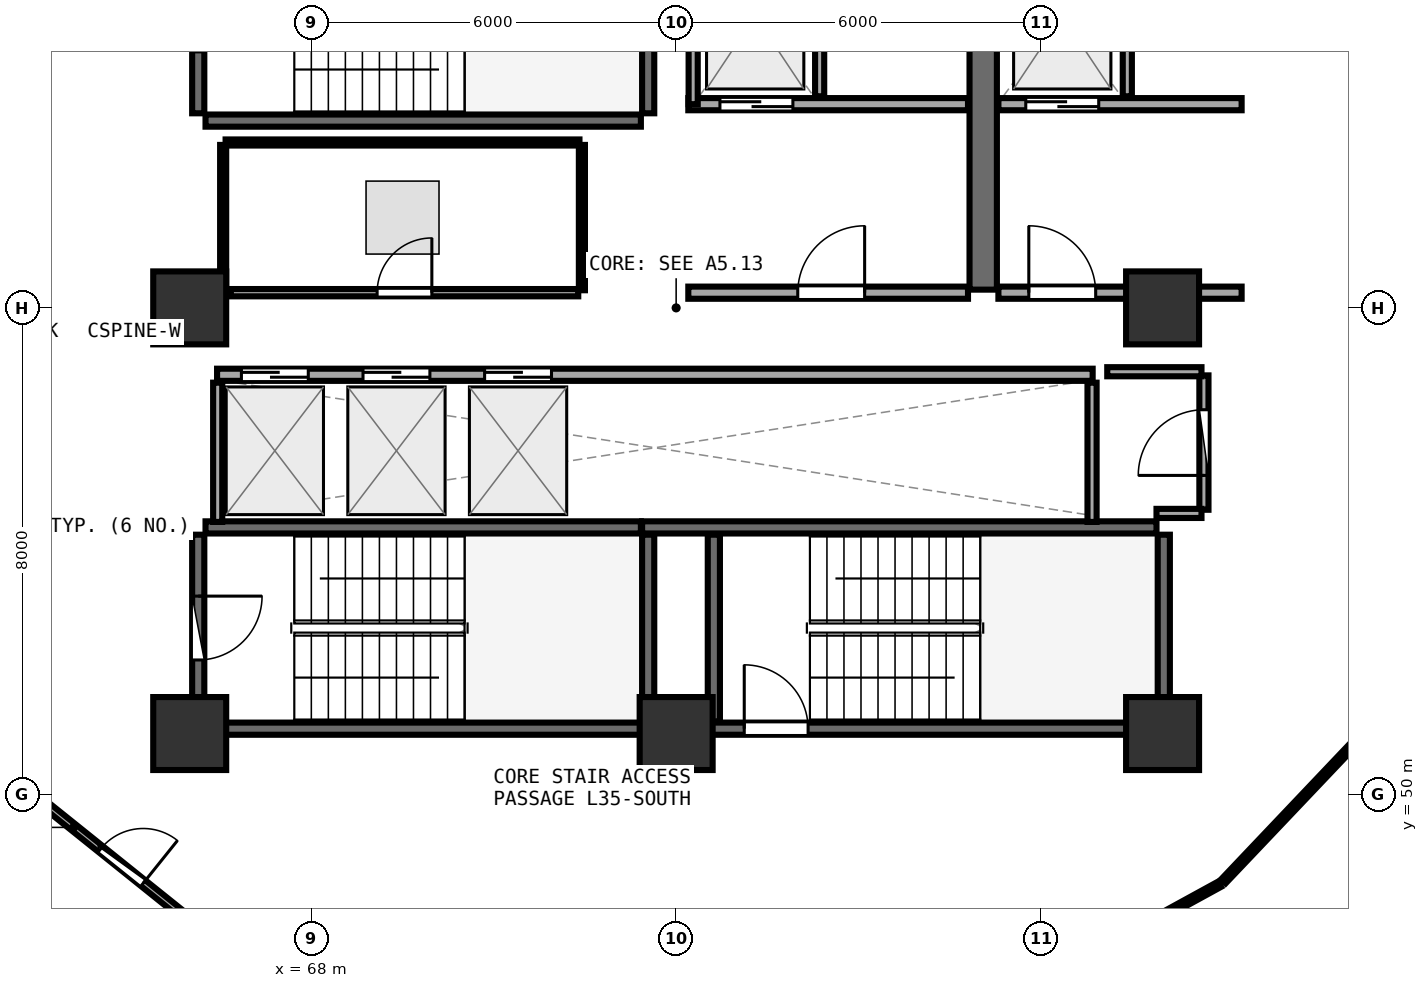
"""IFC4 building model, lengths in metres.
Left out: names, types, materials, properties, quantities, classifications, styles, units other than length and angle.
Written with IfcOpenShell. Run it as: python <this file> out.ifc"""

import sys

from ifc_helpers import new_model, si_unit, direction, frame, frame_2d, origin, origin_2d, place, context, subcontext, project, spatial, rectangle, extrude, element, fill, save


model = new_model("IFC4")
c1 = context("Model", 3, precision=1e-05, world=origin(), true_north=direction((0.0, 1.0)))
c2 = subcontext(c1, "Body", "Model", "MODEL_VIEW")
j1 = project(units=[si_unit("LENGTHUNIT", "METRE"), si_unit("PLANEANGLEUNIT", "RADIAN")], contexts=[c1])
p1 = place(None, origin())
s1 = spatial("IfcSite", under=j1, at=p1, CompositionType="ELEMENT")
p2 = place(p1, origin())
s2 = spatial("IfcBuilding", under=s1, at=p2, CompositionType="ELEMENT")
p3 = place(p2, frame((0.0, 0.0, 139.35)))
s3 = spatial("IfcBuildingStorey", under=s2, at=p3, CompositionType="ELEMENT", Elevation=139.35)
for number, where, z_axis, x_axis in (
    (1, (66.0, 51.0, 0.0), (0.0, 0.0, 1.0), (1.0, 0.0, 0.0)),
    (2, (74.0, 51.0, 0.0), (0.0, 0.0, 1.0), (1.0, 0.0, 0.0)),
    (3, (82.0, 51.0, 0.0), (0.0, 0.0, 1.0), (1.0, 0.0, 0.0)),
    (4, (82.0, 58.0, 0.0), (0.0, 0.0, 1.0), (1.0, 0.0, 0.0)),
    (5, (66.0, 58.0, 0.0), (0.0, 0.0, 1.0), (1.0, 0.0, 0.0)),
):
    element("IfcColumn", number, at=place(p3, frame(where, z_axis=z_axis, x_axis=x_axis)), inside=s3, PredefinedType="PILASTER", context=c2, shape_type="SweptSolid", body=[
        extrude(rectangle(XDim=1.2, YDim=1.2, at=origin_2d()), origin(), (0.0, 0.0, 1.0), 3.75),
    ])
p4 = place(p3, frame((66.26, 61.08, 0.0), z_axis=(0.0, 0.0, 1.0), x_axis=(1.0, 0.0, 0.0)))
e6 = element("IfcWall", 6, at=p4, inside=s3, PredefinedType="SHEAR", context=c2, shape_type="SweptSolid", body=[
    extrude(rectangle(XDim=7.16, YDim=0.2, at=frame_2d((3.58, 0.0))), origin(), (0.0, 0.0, 1.0), 3.49),
])
p5 = place(p3, frame((73.54, 61.2, 0.0), z_axis=(0.0, 0.0, 1.0), x_axis=(0.0, 1.0, 0.0)))
e7 = element("IfcWall", 7, at=p5, inside=s3, PredefinedType="SHEAR", context=c2, shape_type="SweptSolid", body=[
    extrude(rectangle(XDim=3.07, YDim=0.2, at=frame_2d((1.535, 0.0))), origin(), (0.0, 0.0, 1.0), 3.49),
])
p6 = place(p3, frame((66.14, 64.27, 0.0), z_axis=(0.0, 0.0, 1.0), x_axis=(0.0, -1.0, 0.0)))
e8 = element("IfcWall", 8, at=p6, inside=s3, PredefinedType="SHEAR", context=c2, shape_type="SweptSolid", body=[
    extrude(rectangle(XDim=3.07, YDim=0.2, at=frame_2d((1.535, 0.0))), origin(), (0.0, 0.0, 1.0), 3.49),
])
p7 = place(p6, frame((1.01, 0.0, 0.0)))
e9 = element("IfcOpeningElement", 9, at=p7, cuts=e8, PredefinedType="OPENING", context=c2, shape_type="SweptSolid", body=[
    extrude(rectangle(XDim=1.05, YDim=2.1, at=frame_2d((0.525, 1.05))), frame((0.0, 0.11, 0.0), z_axis=(0.0, -1.0, 0.0), x_axis=(1.0, 0.0, 0.0)), (0.0, 0.0, 1.0), 0.22),
])
p8 = place(p3, frame((74.0, 51.08, 0.0), z_axis=(0.0, 0.0, 1.0), x_axis=(1.0, 0.0, 0.0)))
e10 = element("IfcWall", 10, at=p8, inside=s3, PredefinedType="SHEAR", context=c2, shape_type="SweptSolid", body=[
    extrude(rectangle(XDim=7.9, YDim=0.2, at=frame_2d((3.95, 0.0))), origin(), (0.0, 0.0, 1.0), 3.49),
])
p9 = place(p8, frame((1.12, 0.0, 0.0)))
e11 = element("IfcOpeningElement", 11, at=p9, cuts=e10, PredefinedType="OPENING", context=c2, shape_type="SweptSolid", body=[
    extrude(rectangle(XDim=1.05, YDim=2.1, at=frame_2d((0.525, 1.05))), frame((0.0, 0.11, 0.0), z_axis=(0.0, -1.0, 0.0), x_axis=(1.0, 0.0, 0.0)), (0.0, 0.0, 1.0), 0.22),
])
p10 = place(p3, frame((82.02, 51.2, 0.0), z_axis=(0.0, 0.0, 1.0), x_axis=(0.0, 1.0, 0.0)))
e12 = element("IfcWall", 12, at=p10, inside=s3, PredefinedType="SHEAR", context=c2, shape_type="SweptSolid", body=[
    extrude(rectangle(XDim=3.07, YDim=0.2, at=frame_2d((1.535, 0.0))), origin(), (0.0, 0.0, 1.0), 3.49),
])
p11 = place(p3, frame((81.9, 54.39, 0.0), z_axis=(0.0, 0.0, 1.0), x_axis=(-1.0, 0.0, 0.0)))
e13 = element("IfcWall", 13, at=p11, inside=s3, PredefinedType="SHEAR", context=c2, shape_type="SweptSolid", body=[
    extrude(rectangle(XDim=8.46, YDim=0.2, at=frame_2d((4.23, 0.0))), origin(), (0.0, 0.0, 1.0), 3.49),
])
p12 = place(p3, frame((74.62, 54.27, 0.0), z_axis=(0.0, 0.0, 1.0), x_axis=(0.0, -1.0, 0.0)))
e14 = element("IfcWall", 14, at=p12, inside=s3, PredefinedType="SHEAR", context=c2, shape_type="SweptSolid", body=[
    extrude(rectangle(XDim=3.07, YDim=0.2, at=frame_2d((1.535, 0.0))), origin(), (0.0, 0.0, 1.0), 3.49),
])
p13 = place(p3, frame((66.26, 51.08, 0.0), z_axis=(0.0, 0.0, 1.0), x_axis=(1.0, 0.0, 0.0)))
e15 = element("IfcWall", 15, at=p13, inside=s3, PredefinedType="SHEAR", context=c2, shape_type="SweptSolid", body=[
    extrude(rectangle(XDim=7.16, YDim=0.2, at=frame_2d((3.58, 0.0))), origin(), (0.0, 0.0, 1.0), 3.49),
])
p14 = place(p3, frame((73.54, 51.2, 0.0), z_axis=(0.0, 0.0, 1.0), x_axis=(0.0, 1.0, 0.0)))
e16 = element("IfcWall", 16, at=p14, inside=s3, PredefinedType="SHEAR", context=c2, shape_type="SweptSolid", body=[
    extrude(rectangle(XDim=3.07, YDim=0.2, at=frame_2d((1.535, 0.0))), origin(), (0.0, 0.0, 1.0), 3.49),
])
p15 = place(p3, frame((73.42, 54.39, 0.0), z_axis=(0.0, 0.0, 1.0), x_axis=(-1.0, 0.0, 0.0)))
e17 = element("IfcWall", 17, at=p15, inside=s3, PredefinedType="SHEAR", context=c2, shape_type="SweptSolid", body=[
    extrude(rectangle(XDim=7.16, YDim=0.2, at=frame_2d((3.58, 0.0))), origin(), (0.0, 0.0, 1.0), 3.49),
])
p16 = place(p3, frame((66.14, 54.27, 0.0), z_axis=(0.0, 0.0, 1.0), x_axis=(0.0, -1.0, 0.0)))
e18 = element("IfcWall", 18, at=p16, inside=s3, PredefinedType="SHEAR", context=c2, shape_type="SweptSolid", body=[
    extrude(rectangle(XDim=3.07, YDim=0.2, at=frame_2d((1.535, 0.0))), origin(), (0.0, 0.0, 1.0), 3.49),
])
p17 = place(p16, frame((1.01, 0.0, 0.0)))
e19 = element("IfcOpeningElement", 19, at=p17, cuts=e18, PredefinedType="OPENING", context=c2, shape_type="SweptSolid", body=[
    extrude(rectangle(XDim=1.05, YDim=2.1, at=frame_2d((0.525, 1.05))), frame((0.0, 0.11, 0.0), z_axis=(0.0, -1.0, 0.0), x_axis=(1.0, 0.0, 0.0)), (0.0, 0.0, 1.0), 0.22),
])
p18 = place(p3, frame((79.05, 58.3, 0.0), z_axis=(0.0, 0.0, 1.0), x_axis=(0.0, 1.0, 0.0)))
e20 = element("IfcWall", 20, at=p18, inside=s3, PredefinedType="SHEAR", context=c2, shape_type="SweptSolid", body=[
    extrude(rectangle(XDim=6.3, YDim=0.45, at=frame_2d((3.15, 0.0))), origin(), (0.0, 0.0, 1.0), 3.49),
])
p19 = place(p3, frame((74.2, 61.35, 0.0), z_axis=(0.0, 0.0, 1.0), x_axis=(1.0, 0.0, 0.0)))
e21 = element("IfcWall", 21, at=p19, inside=s3, PredefinedType="SOLIDWALL", context=c2, shape_type="SweptSolid", body=[
    extrude(rectangle(XDim=4.6, YDim=0.2, at=frame_2d((2.3, 0.0))), origin(), (0.0, 0.0, 1.0), 3.48),
])
p20 = place(p19, frame((0.52, 0.0, 0.0)))
e22 = element("IfcOpeningElement", 22, at=p20, cuts=e21, PredefinedType="OPENING", context=c2, shape_type="SweptSolid", body=[
    extrude(rectangle(XDim=1.2, YDim=2.15, at=frame_2d((0.6, 1.075))), frame((0.0, 0.11, 0.0), z_axis=(0.0, -1.0, 0.0), x_axis=(1.0, 0.0, 0.0)), (0.0, 0.0, 1.0), 0.22),
])
p21 = place(p3, frame((74.28, 61.35, 0.0), z_axis=(0.0, 0.0, 1.0), x_axis=(0.0, 1.0, 0.0)))
e23 = element("IfcWall", 23, at=p21, inside=s3, PredefinedType="PARTITIONING", context=c2, shape_type="SweptSolid", body=[
    extrude(rectangle(XDim=2.97, YDim=0.15, at=frame_2d((1.485, 0.0))), origin(), (0.0, 0.0, 1.0), 3.48),
])
p22 = place(p3, frame((76.36, 61.48, 0.0), z_axis=(0.0, 0.0, 1.0), x_axis=(0.0, 1.0, 0.0)))
e24 = element("IfcWall", 24, at=p22, inside=s3, PredefinedType="PARTITIONING", context=c2, shape_type="SweptSolid", body=[
    extrude(rectangle(XDim=2.84, YDim=0.15, at=frame_2d((1.42, 0.0))), origin(), (0.0, 0.0, 1.0), 3.48),
])
p23 = place(p3, frame((79.3, 61.35, 0.0), z_axis=(0.0, 0.0, 1.0), x_axis=(1.0, 0.0, 0.0)))
e25 = element("IfcWall", 25, at=p23, inside=s3, PredefinedType="SOLIDWALL", context=c2, shape_type="SweptSolid", body=[
    extrude(rectangle(XDim=4.0, YDim=0.2, at=frame_2d((2.0, 0.0))), origin(), (0.0, 0.0, 1.0), 2.775),
])
p24 = place(p23, frame((0.45, 0.0, 0.0)))
e26 = element("IfcOpeningElement", 26, at=p24, cuts=e25, PredefinedType="OPENING", context=c2, shape_type="SweptSolid", body=[
    extrude(rectangle(XDim=1.2, YDim=2.15, at=frame_2d((0.6, 1.075))), frame((0.0, 0.11, 0.0), z_axis=(0.0, -1.0, 0.0), x_axis=(1.0, 0.0, 0.0)), (0.0, 0.0, 1.0), 0.22),
])
p25 = place(p3, frame((81.42, 61.48, 0.0), z_axis=(0.0, 0.0, 1.0), x_axis=(0.0, 1.0, 0.0)))
e27 = element("IfcWall", 27, at=p25, inside=s3, PredefinedType="PARTITIONING", context=c2, shape_type="SweptSolid", body=[
    extrude(rectangle(XDim=2.84, YDim=0.15, at=frame_2d((1.42, 0.0))), origin(), (0.0, 0.0, 1.0), 3.48),
])
p26 = place(p3, frame((74.2, 58.25, 0.0), z_axis=(0.0, 0.0, 1.0), x_axis=(1.0, 0.0, 0.0)))
e28 = element("IfcWall", 28, at=p26, inside=s3, PredefinedType="SOLIDWALL", context=c2, shape_type="SweptSolid", body=[
    extrude(rectangle(XDim=4.6, YDim=0.2, at=frame_2d((2.3, 0.0))), origin(), (0.0, 0.0, 1.0), 3.48),
])
p27 = place(p26, frame((1.8, 0.0, 0.0)))
e29 = element("IfcOpeningElement", 29, at=p27, cuts=e28, PredefinedType="OPENING", context=c2, shape_type="SweptSolid", body=[
    extrude(rectangle(XDim=1.1, YDim=2.1, at=frame_2d((0.55, 1.05))), frame((0.0, 0.11, 0.0), z_axis=(0.0, -1.0, 0.0), x_axis=(1.0, 0.0, 0.0)), (0.0, 0.0, 1.0), 0.22),
])
p28 = place(p3, frame((79.3, 58.25, 0.0), z_axis=(0.0, 0.0, 1.0), x_axis=(1.0, 0.0, 0.0)))
e30 = element("IfcWall", 30, at=p28, inside=s3, PredefinedType="SOLIDWALL", context=c2, shape_type="SweptSolid", body=[
    extrude(rectangle(XDim=4.0, YDim=0.2, at=frame_2d((2.0, 0.0))), origin(), (0.0, 0.0, 1.0), 2.775),
])
p29 = place(p28, frame((0.5, 0.0, 0.0)))
e31 = element("IfcOpeningElement", 31, at=p29, cuts=e30, PredefinedType="OPENING", context=c2, shape_type="SweptSolid", body=[
    extrude(rectangle(XDim=1.1, YDim=2.1, at=frame_2d((0.55, 1.05))), frame((0.0, 0.11, 0.0), z_axis=(0.0, -1.0, 0.0), x_axis=(1.0, 0.0, 0.0)), (0.0, 0.0, 1.0), 0.22),
])
p30 = place(p3, frame((66.45, 56.9, 0.0), z_axis=(0.0, 0.0, 1.0), x_axis=(1.0, 0.0, 0.0)))
e32 = element("IfcWall", 32, at=p30, inside=s3, PredefinedType="SOLIDWALL", context=c2, shape_type="SweptSolid", body=[
    extrude(rectangle(XDim=14.4, YDim=0.2, at=frame_2d((7.2, 0.0))), origin(), (0.0, 0.0, 1.0), 3.48),
])
p31 = place(p30, frame((0.4, 0.0, 0.0)))
e33 = element("IfcOpeningElement", 33, at=p31, cuts=e32, PredefinedType="OPENING", context=c2, shape_type="SweptSolid", body=[
    extrude(rectangle(XDim=1.1, YDim=2.1, at=frame_2d((0.55, 1.05))), frame((0.0, 0.11, 0.0), z_axis=(0.0, -1.0, 0.0), x_axis=(1.0, 0.0, 0.0)), (0.0, 0.0, 1.0), 0.22),
])
p32 = place(p30, frame((2.4, 0.0, 0.0)))
e34 = element("IfcOpeningElement", 34, at=p32, cuts=e32, PredefinedType="OPENING", context=c2, shape_type="SweptSolid", body=[
    extrude(rectangle(XDim=1.1, YDim=2.1, at=frame_2d((0.55, 1.05))), frame((0.0, 0.11, 0.0), z_axis=(0.0, -1.0, 0.0), x_axis=(1.0, 0.0, 0.0)), (0.0, 0.0, 1.0), 0.22),
])
p33 = place(p30, frame((4.4, 0.0, 0.0)))
e35 = element("IfcOpeningElement", 35, at=p33, cuts=e32, PredefinedType="OPENING", context=c2, shape_type="SweptSolid", body=[
    extrude(rectangle(XDim=1.1, YDim=2.1, at=frame_2d((0.55, 1.05))), frame((0.0, 0.11, 0.0), z_axis=(0.0, -1.0, 0.0), x_axis=(1.0, 0.0, 0.0)), (0.0, 0.0, 1.0), 0.22),
])
for number, where, z_axis, x_axis in (
    (36, (66.46, 54.48, 0.0), (0.0, 0.0, 1.0), (0.0, 1.0, 0.0)),
    (37, (80.84, 54.48, 0.0), (0.0, 0.0, 1.0), (0.0, 1.0, 0.0)),
):
    element("IfcWall", number, at=place(p3, frame(where, z_axis=z_axis, x_axis=x_axis)), inside=s3, PredefinedType="PARTITIONING", context=c2, shape_type="SweptSolid", body=[
        extrude(rectangle(XDim=2.29, YDim=0.15, at=frame_2d((1.145, 0.0))), origin(), (0.0, 0.0, 1.0), 3.48),
    ])
p34 = place(p3, frame((82.68, 54.68, 0.0), z_axis=(0.0, 0.0, 1.0), x_axis=(0.0, 1.0, 0.0)))
e38 = element("IfcWall", 38, at=p34, inside=s3, PredefinedType="PARTITIONING", context=c2, shape_type="SweptSolid", body=[
    extrude(rectangle(XDim=2.21, YDim=0.15, at=frame_2d((1.105, 0.0))), origin(), (0.0, 0.0, 1.0), 3.48),
])
p35 = place(p34, frame((0.565, 0.0, 0.0)))
e39 = element("IfcOpeningElement", 39, at=p35, cuts=e38, PredefinedType="OPENING", context=c2, shape_type="SweptSolid", body=[
    extrude(rectangle(XDim=1.08, YDim=2.1, at=frame_2d((0.54, 1.05))), frame((0.0, 0.085, 0.0), z_axis=(0.0, -1.0, 0.0), x_axis=(1.0, 0.0, 0.0)), (0.0, 0.0, 1.0), 0.17),
])
p36 = place(p3, frame((66.675, 58.25, 0.0), z_axis=(0.0, 0.0, 1.0), x_axis=(1.0, 0.0, 0.0)))
e40 = element("IfcWall", 40, at=p36, inside=s3, PredefinedType="PARTITIONING", context=c2, shape_type="SweptSolid", body=[
    extrude(rectangle(XDim=5.715, YDim=0.12, at=frame_2d((2.857, 0.0))), origin(), (0.0, 0.0, 1.0), 3.48),
])
p37 = place(p36, frame((2.407, 0.0, 0.0)))
e41 = element("IfcOpeningElement", 41, at=p37, cuts=e40, PredefinedType="OPENING", context=c2, shape_type="SweptSolid", body=[
    extrude(rectangle(XDim=0.9, YDim=2.08, at=frame_2d((0.45, 1.04))), frame((0.0, 0.07, 0.0), z_axis=(0.0, -1.0, 0.0), x_axis=(1.0, 0.0, 0.0)), (0.0, 0.0, 1.0), 0.14),
])
p38 = place(p3, frame((63.468, 49.957, 0.0), z_axis=(0.0, 0.0, 1.0), x_axis=(0.78006790059, -0.625694870099, 0.0)))
e42 = element("IfcWall", 42, at=p38, inside=s3, PredefinedType="PARTITIONING", context=c2, shape_type="SweptSolid", body=[
    extrude(rectangle(XDim=3.631, YDim=0.12, at=frame_2d((1.815, 0.0))), origin(), (0.0, 0.0, 1.0), 2.975),
])
p39 = place(p38, frame((1.366, 0.0, 0.0)))
e43 = element("IfcOpeningElement", 43, at=p39, cuts=e42, PredefinedType="OPENING", context=c2, shape_type="SweptSolid", body=[
    extrude(rectangle(XDim=0.9, YDim=2.08, at=frame_2d((0.45, 1.04))), frame((0.0, 0.07, 0.0), z_axis=(0.0, -1.0, 0.0), x_axis=(1.0, 0.0, 0.0)), (0.0, 0.0, 1.0), 0.14),
])
p40 = place(p3, frame((81.9, 54.62, 0.0), z_axis=(0.0, 0.0, 1.0), x_axis=(1.0, 0.0, 0.0)))
e44 = element("IfcWall", 44, at=p40, inside=s3, PredefinedType="PARTITIONING", context=c2, shape_type="SweptSolid", body=[
    extrude(rectangle(XDim=0.74, YDim=0.15, at=frame_2d((0.37, 0.0))), origin(), (0.0, 0.0, 1.0), 2.775),
])
p41 = place(p3, frame((82.64, 56.95, 0.0), z_axis=(0.0, 0.0, 1.0), x_axis=(-1.0, 0.0, 0.0)))
e45 = element("IfcWall", 45, at=p41, inside=s3, PredefinedType="PARTITIONING", context=c2, shape_type="SweptSolid", body=[
    extrude(rectangle(XDim=1.55, YDim=0.15, at=frame_2d((0.775, 0.0))), origin(), (0.0, 0.0, 1.0), 2.775),
])
p42 = place(p3, frame((72.45, 58.29, 0.0), z_axis=(0.0, 0.0, 1.0), x_axis=(0.0, 1.0, 0.0)))
e46 = element("IfcWall", 46, at=p42, inside=s3, PredefinedType="PARTITIONING", context=c2, shape_type="SweptSolid", body=[
    extrude(rectangle(XDim=2.39, YDim=0.1, at=frame_2d((1.195, 0.0))), origin(), (0.0, 0.0, 1.0), 3.48),
])
p43 = place(p3, frame((72.41, 60.72, 0.0), z_axis=(0.0, 0.0, 1.0), x_axis=(-1.0, 0.0, 0.0)))
e47 = element("IfcWall", 47, at=p43, inside=s3, PredefinedType="PARTITIONING", context=c2, shape_type="SweptSolid", body=[
    extrude(rectangle(XDim=5.82, YDim=0.1, at=frame_2d((2.91, 0.0))), origin(), (0.0, 0.0, 1.0), 3.48),
])
p44 = place(p3, frame((66.55, 60.68, 0.0), z_axis=(0.0, 0.0, 1.0), x_axis=(0.0, -1.0, 0.0)))
e48 = element("IfcWall", 48, at=p44, inside=s3, PredefinedType="PARTITIONING", context=c2, shape_type="SweptSolid", body=[
    extrude(rectangle(XDim=2.383, YDim=0.1, at=frame_2d((1.191, 0.0))), origin(), (0.0, 0.0, 1.0), 3.48),
])
p45 = place(p3, frame((79.283, 46.519, 0.0), z_axis=(0.0, 0.0, 1.0), x_axis=(0.876994001609, 0.480501322726, 0.0)))
e49 = element("IfcWall", 49, at=p45, inside=s3, PredefinedType="PARTITIONING", context=c2, shape_type="SweptSolid", body=[
    extrude(rectangle(XDim=4.167, YDim=0.1, at=frame_2d((2.084, 0.0))), origin(), (0.0, 0.0, 1.0), 2.975),
])
p46 = place(p3, frame((83.0, 48.57, 0.0), z_axis=(0.0, 0.0, 1.0), x_axis=(0.688528308603, 0.725209465088, 0.0)))
e50 = element("IfcWall", 50, at=p46, inside=s3, PredefinedType="PARTITIONING", context=c2, shape_type="SweptSolid", body=[
    extrude(rectangle(XDim=4.033, YDim=0.1, at=frame_2d((2.017, 0.0))), origin(), (0.0, 0.0, 1.0), 2.975),
])
p47 = place(p3, frame((87.749, 59.227, 0.0), z_axis=(0.0, 0.0, 1.0), x_axis=(-0.431199882011, 0.902256427937, 0.0)))
e51 = element("IfcWall", 51, at=p47, inside=s3, PredefinedType="PARTITIONING", context=c2, shape_type="SweptSolid", body=[
    extrude(rectangle(XDim=7.638, YDim=0.1, at=frame_2d((3.819, 0.0))), origin(), (0.0, 0.0, 1.0), 2.975),
])
p48 = place(p9, origin())
e52 = element("IfcDoor", 52, at=p48, inside=s3, OperationType="SINGLE_SWING_LEFT", PredefinedType="DOOR", context=c2, shape_type="SweptSolid", body=[
    extrude(rectangle(XDim=1.05, YDim=2.1, at=frame_2d((0.525, 1.05))), frame((0.0, 0.025, 0.0), z_axis=(0.0, -1.0, 0.0), x_axis=(1.0, 0.0, 0.0)), (0.0, 0.0, 1.0), 0.05),
])
fill(e11, e52)
p49 = place(p17, origin())
e53 = element("IfcDoor", 53, at=p49, inside=s3, OperationType="SINGLE_SWING_LEFT", PredefinedType="DOOR", context=c2, shape_type="SweptSolid", body=[
    extrude(rectangle(XDim=1.05, YDim=2.1, at=frame_2d((0.525, 1.05))), frame((0.0, 0.025, 0.0), z_axis=(0.0, -1.0, 0.0), x_axis=(1.0, 0.0, 0.0)), (0.0, 0.0, 1.0), 0.05),
])
fill(e19, e53)
p50 = place(p20, origin())
e54 = element("IfcDoor", 54, at=p50, inside=s3, OperationType="DOUBLE_DOOR_SLIDING", PredefinedType="DOOR", context=c2, shape_type="SweptSolid", body=[
    extrude(rectangle(XDim=1.2, YDim=2.15, at=frame_2d((0.6, 1.075))), frame((0.0, 0.025, 0.0), z_axis=(0.0, -1.0, 0.0), x_axis=(1.0, 0.0, 0.0)), (0.0, 0.0, 1.0), 0.05),
])
fill(e22, e54)
p51 = place(p24, origin())
e55 = element("IfcDoor", 55, at=p51, inside=s3, OperationType="DOUBLE_DOOR_SLIDING", PredefinedType="DOOR", context=c2, shape_type="SweptSolid", body=[
    extrude(rectangle(XDim=1.2, YDim=2.15, at=frame_2d((0.6, 1.075))), frame((0.0, 0.025, 0.0), z_axis=(0.0, -1.0, 0.0), x_axis=(1.0, 0.0, 0.0)), (0.0, 0.0, 1.0), 0.05),
])
fill(e26, e55)
p52 = place(p27, frame((1.1, 0.0, 0.0), z_axis=(0.0, 0.0, 1.0), x_axis=(-1.0, 0.0, 0.0)))
e56 = element("IfcDoor", 56, at=p52, inside=s3, OperationType="SINGLE_SWING_LEFT", PredefinedType="DOOR", context=c2, shape_type="SweptSolid", body=[
    extrude(rectangle(XDim=1.1, YDim=2.1, at=frame_2d((0.55, 1.05))), frame((0.0, 0.025, 0.0), z_axis=(0.0, -1.0, 0.0), x_axis=(1.0, 0.0, 0.0)), (0.0, 0.0, 1.0), 0.05),
])
fill(e29, e56)
p53 = place(p29, frame((1.1, 0.0, 0.0), z_axis=(0.0, 0.0, 1.0), x_axis=(-1.0, 0.0, 0.0)))
e57 = element("IfcDoor", 57, at=p53, inside=s3, OperationType="SINGLE_SWING_RIGHT", PredefinedType="DOOR", context=c2, shape_type="SweptSolid", body=[
    extrude(rectangle(XDim=1.1, YDim=2.1, at=frame_2d((0.55, 1.05))), frame((0.0, 0.025, 0.0), z_axis=(0.0, -1.0, 0.0), x_axis=(1.0, 0.0, 0.0)), (0.0, 0.0, 1.0), 0.05),
])
fill(e31, e57)
p54 = place(p31, origin())
e58 = element("IfcDoor", 58, at=p54, inside=s3, OperationType="DOUBLE_DOOR_SLIDING", PredefinedType="DOOR", context=c2, shape_type="SweptSolid", body=[
    extrude(rectangle(XDim=1.1, YDim=2.1, at=frame_2d((0.55, 1.05))), frame((0.0, 0.025, 0.0), z_axis=(0.0, -1.0, 0.0), x_axis=(1.0, 0.0, 0.0)), (0.0, 0.0, 1.0), 0.05),
])
fill(e33, e58)
p55 = place(p32, origin())
e59 = element("IfcDoor", 59, at=p55, inside=s3, OperationType="DOUBLE_DOOR_SLIDING", PredefinedType="DOOR", context=c2, shape_type="SweptSolid", body=[
    extrude(rectangle(XDim=1.1, YDim=2.1, at=frame_2d((0.55, 1.05))), frame((0.0, 0.025, 0.0), z_axis=(0.0, -1.0, 0.0), x_axis=(1.0, 0.0, 0.0)), (0.0, 0.0, 1.0), 0.05),
])
fill(e34, e59)
p56 = place(p33, origin())
e60 = element("IfcDoor", 60, at=p56, inside=s3, OperationType="DOUBLE_DOOR_SLIDING", PredefinedType="DOOR", context=c2, shape_type="SweptSolid", body=[
    extrude(rectangle(XDim=1.1, YDim=2.1, at=frame_2d((0.55, 1.05))), frame((0.0, 0.025, 0.0), z_axis=(0.0, -1.0, 0.0), x_axis=(1.0, 0.0, 0.0)), (0.0, 0.0, 1.0), 0.05),
])
fill(e35, e60)
p57 = place(p35, origin())
e61 = element("IfcDoor", 61, at=p57, inside=s3, OperationType="SINGLE_SWING_LEFT", PredefinedType="DOOR", context=c2, shape_type="SweptSolid", body=[
    extrude(rectangle(XDim=1.08, YDim=2.1, at=frame_2d((0.54, 1.05))), frame((0.0, 0.025, 0.0), z_axis=(0.0, -1.0, 0.0), x_axis=(1.0, 0.0, 0.0)), (0.0, 0.0, 1.0), 0.05),
])
fill(e39, e61)
p58 = place(p37, origin())
e62 = element("IfcDoor", 62, at=p58, inside=s3, OperationType="SINGLE_SWING_RIGHT", PredefinedType="DOOR", context=c2, shape_type="SweptSolid", body=[
    extrude(rectangle(XDim=0.9, YDim=2.08, at=frame_2d((0.45, 1.04))), frame((0.0, 0.025, 0.0), z_axis=(0.0, -1.0, 0.0), x_axis=(1.0, 0.0, 0.0)), (0.0, 0.0, 1.0), 0.05),
])
fill(e41, e62)
p59 = place(p39, origin())
e63 = element("IfcDoor", 63, at=p59, inside=s3, OperationType="SINGLE_SWING_RIGHT", PredefinedType="DOOR", context=c2, shape_type="SweptSolid", body=[
    extrude(rectangle(XDim=0.9, YDim=2.08, at=frame_2d((0.45, 1.04))), frame((0.0, 0.025, 0.0), z_axis=(0.0, -1.0, 0.0), x_axis=(1.0, 0.0, 0.0)), (0.0, 0.0, 1.0), 0.05),
])
fill(e43, e63)
save(model, sys.argv[1])
